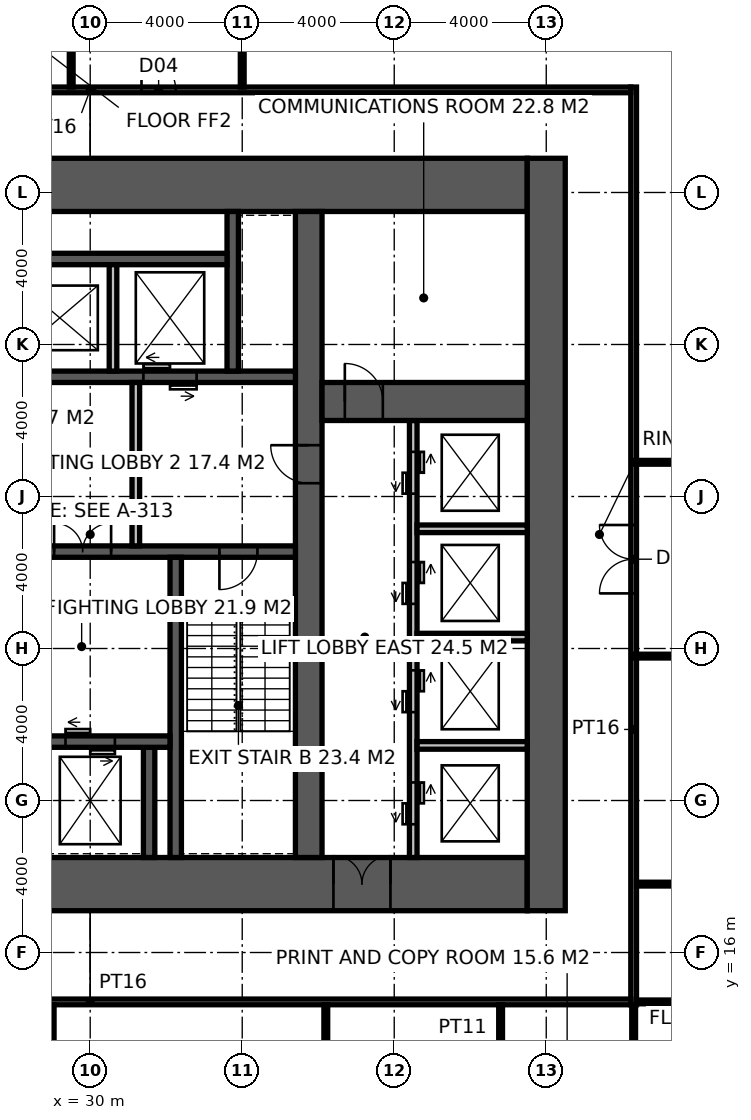
"""IFC4 building model, lengths in metres.
Left out: names, types, materials, properties, quantities, classifications, styles, units other than length and angle.
Written with IfcOpenShell. Run it as: python <this file> out.ifc"""

import sys

from ifc_helpers import new_model, si_unit, direction, frame, frame_2d, origin, place, context, subcontext, project, spatial, rectangle, extrude, element, fill, save


model = new_model("IFC4")
c1 = context("Model", 3, precision=1e-05, world=origin(), true_north=direction((0.0, 1.0)))
c2 = subcontext(c1, "Body", "Model", "MODEL_VIEW")
j1 = project(units=[si_unit("LENGTHUNIT", "METRE"), si_unit("PLANEANGLEUNIT", "RADIAN")], contexts=[c1])
p1 = place(None, origin())
s1 = spatial("IfcSite", under=j1, at=p1, CompositionType="ELEMENT")
p2 = place(p1, origin())
s2 = spatial("IfcBuilding", under=s1, at=p2, CompositionType="ELEMENT")
p3 = place(p2, frame((0.0, 0.0, 39.0)))
s3 = spatial("IfcBuildingStorey", under=s2, at=p3, CompositionType="ELEMENT", Elevation=39.0)
p4 = place(p3, frame((18.5, 17.8, -0.15), z_axis=(0.0, 0.0, 1.0), x_axis=(1.0, 0.0, 0.0)))
e1 = element("IfcWall", 1, at=p4, inside=s3, PredefinedType="SHEAR", context=c2, shape_type="SweptSolid", body=[
    extrude(rectangle(XDim=23.0, YDim=1.4, at=frame_2d((11.5, 0.0))), origin(), (0.0, 0.0, 1.0), 4.0),
])
p5 = place(p4, frame((3.45, 0.0, 0.15)))
e2 = element("IfcOpeningElement", 2, at=p5, cuts=e1, PredefinedType="OPENING", context=c2, shape_type="SweptSolid", body=[
    extrude(rectangle(XDim=1.5, YDim=2.4, at=frame_2d((0.75, 1.2))), frame((0.0, 0.71, 0.0), z_axis=(0.0, -1.0, 0.0), x_axis=(1.0, 0.0, 0.0)), (0.0, 0.0, 1.0), 1.42),
])
p6 = place(p4, frame((17.9, 0.0, 0.15)))
e3 = element("IfcOpeningElement", 3, at=p6, cuts=e1, PredefinedType="OPENING", context=c2, shape_type="SweptSolid", body=[
    extrude(rectangle(XDim=1.5, YDim=2.4, at=frame_2d((0.75, 1.2))), frame((0.0, 0.71, 0.0), z_axis=(0.0, -1.0, 0.0), x_axis=(1.0, 0.0, 0.0)), (0.0, 0.0, 1.0), 1.42),
])
p7 = place(p4, frame((0.9, 0.0, 0.15)))
e4 = element("IfcOpeningElement", 4, at=p7, cuts=e1, PredefinedType="OPENING", context=c2, shape_type="SweptSolid", body=[
    extrude(rectangle(XDim=1.0, YDim=2.2, at=frame_2d((0.5, 1.1))), frame((0.0, 0.71, 0.0), z_axis=(0.0, -1.0, 0.0), x_axis=(1.0, 0.0, 0.0)), (0.0, 0.0, 1.0), 1.42),
])
p8 = place(p3, frame((18.5, 36.2, -0.15), z_axis=(0.0, 0.0, 1.0), x_axis=(1.0, 0.0, 0.0)))
e5 = element("IfcWall", 5, at=p8, inside=s3, PredefinedType="SHEAR", context=c2, shape_type="SweptSolid", body=[
    extrude(rectangle(XDim=23.0, YDim=1.4, at=frame_2d((11.5, 0.0))), origin(), (0.0, 0.0, 1.0), 4.0),
])
p9 = place(p3, frame((42.0, 17.1, -0.15), z_axis=(0.0, 0.0, 1.0), x_axis=(0.0, 1.0, 0.0)))
e6 = element("IfcWall", 6, at=p9, inside=s3, PredefinedType="SHEAR", context=c2, shape_type="SweptSolid", body=[
    extrude(rectangle(XDim=19.8, YDim=1.0, at=frame_2d((9.9, 0.0))), origin(), (0.0, 0.0, 1.0), 4.0),
])
p10 = place(p3, frame((35.75, 18.5, -0.15), z_axis=(0.0, 0.0, 1.0), x_axis=(0.0, 1.0, 0.0)))
e7 = element("IfcWall", 7, at=p10, inside=s3, PredefinedType="SHEAR", context=c2, shape_type="SweptSolid", body=[
    extrude(rectangle(XDim=17.0, YDim=0.7, at=frame_2d((8.5, 0.0))), origin(), (0.0, 0.0, 1.0), 4.0),
])
p11 = place(p10, frame((9.85, 0.0, 0.15)))
e8 = element("IfcOpeningElement", 8, at=p11, cuts=e7, PredefinedType="OPENING", context=c2, shape_type="SweptSolid", body=[
    extrude(rectangle(XDim=1.0, YDim=2.2, at=frame_2d((0.5, 1.1))), frame((0.0, 0.36, 0.0), z_axis=(0.0, -1.0, 0.0), x_axis=(1.0, 0.0, 0.0)), (0.0, 0.0, 1.0), 0.72),
])
p12 = place(p3, frame((24.15, 26.55, -0.15), z_axis=(0.0, 0.0, 1.0), x_axis=(1.0, 0.0, 0.0)))
e9 = element("IfcWall", 9, at=p12, inside=s3, PredefinedType="SHEAR", context=c2, shape_type="SweptSolid", body=[
    extrude(rectangle(XDim=11.25, YDim=0.3, at=frame_2d((5.625, 0.0))), origin(), (0.0, 0.0, 1.0), 4.0),
])
p13 = place(p12, frame((9.25, 0.0, 0.15)))
e10 = element("IfcOpeningElement", 10, at=p13, cuts=e9, PredefinedType="OPENING", context=c2, shape_type="SweptSolid", body=[
    extrude(rectangle(XDim=1.0, YDim=2.2, at=frame_2d((0.5, 1.1))), frame((0.0, 0.16, 0.0), z_axis=(0.0, -1.0, 0.0), x_axis=(1.0, 0.0, 0.0)), (0.0, 0.0, 1.0), 0.32),
])
p14 = place(p12, frame((4.9, 0.0, 0.15)))
e11 = element("IfcOpeningElement", 11, at=p14, cuts=e9, PredefinedType="OPENING", context=c2, shape_type="SweptSolid", body=[
    extrude(rectangle(XDim=1.5, YDim=2.4, at=frame_2d((0.75, 1.2))), frame((0.0, 0.16, 0.0), z_axis=(0.0, -1.0, 0.0), x_axis=(1.0, 0.0, 0.0)), (0.0, 0.0, 1.0), 0.32),
])
p15 = place(p3, frame((32.25, 18.5, -0.15), z_axis=(0.0, 0.0, 1.0), x_axis=(0.0, 1.0, 0.0)))
e12 = element("IfcWall", 12, at=p15, inside=s3, PredefinedType="SHEAR", context=c2, shape_type="SweptSolid", body=[
    extrude(rectangle(XDim=7.9, YDim=0.3, at=frame_2d((3.95, 0.0))), origin(), (0.0, 0.0, 1.0), 4.0),
])
p16 = place(p3, frame((31.55, 18.5, -0.15), z_axis=(0.0, 0.0, 1.0), x_axis=(0.0, 1.0, 0.0)))
e13 = element("IfcWall", 13, at=p16, inside=s3, PredefinedType="SHEAR", context=c2, shape_type="SweptSolid", body=[
    extrude(rectangle(XDim=2.9, YDim=0.3, at=frame_2d((1.45, 0.0))), origin(), (0.0, 0.0, 1.0), 4.0),
])
p17 = place(p3, frame((28.3, 21.55, -0.15), z_axis=(0.0, 0.0, 1.0), x_axis=(1.0, 0.0, 0.0)))
e14 = element("IfcWall", 14, at=p17, inside=s3, PredefinedType="SHEAR", context=c2, shape_type="SweptSolid", body=[
    extrude(rectangle(XDim=3.8, YDim=0.3, at=frame_2d((1.9, 0.0))), origin(), (0.0, 0.0, 1.0), 4.0),
])
p18 = place(p17, frame((1.05, 0.0, 0.15)))
e15 = element("IfcOpeningElement", 15, at=p18, cuts=e14, PredefinedType="OPENING", context=c2, shape_type="SweptSolid", body=[
    extrude(rectangle(XDim=1.3, YDim=2.4, at=frame_2d((0.65, 1.2))), frame((0.0, 0.16, 0.0), z_axis=(0.0, -1.0, 0.0), x_axis=(1.0, 0.0, 0.0)), (0.0, 0.0, 1.0), 0.32),
])
p19 = place(p3, frame((24.15, 31.15, -0.15), z_axis=(0.0, 0.0, 1.0), x_axis=(1.0, 0.0, 0.0)))
e16 = element("IfcWall", 16, at=p19, inside=s3, PredefinedType="SHEAR", context=c2, shape_type="SweptSolid", body=[
    extrude(rectangle(XDim=11.25, YDim=0.3, at=frame_2d((5.625, 0.0))), origin(), (0.0, 0.0, 1.0), 4.0),
])
p20 = place(p19, frame((7.25, 0.0, 0.15)))
e17 = element("IfcOpeningElement", 17, at=p20, cuts=e16, PredefinedType="OPENING", context=c2, shape_type="SweptSolid", body=[
    extrude(rectangle(XDim=1.4, YDim=2.4, at=frame_2d((0.7, 1.2))), frame((0.0, 0.16, 0.0), z_axis=(0.0, -1.0, 0.0), x_axis=(1.0, 0.0, 0.0)), (0.0, 0.0, 1.0), 0.32),
])
p21 = place(p3, frame((33.75, 31.3, -0.15), z_axis=(0.0, 0.0, 1.0), x_axis=(0.0, 1.0, 0.0)))
e18 = element("IfcWall", 18, at=p21, inside=s3, PredefinedType="SHEAR", context=c2, shape_type="SweptSolid", body=[
    extrude(rectangle(XDim=4.2, YDim=0.3, at=frame_2d((2.1, 0.0))), origin(), (0.0, 0.0, 1.0), 4.0),
])
p22 = place(p3, frame((25.0, 34.25, -0.15), z_axis=(0.0, 0.0, 1.0), x_axis=(1.0, 0.0, 0.0)))
e19 = element("IfcWall", 19, at=p22, inside=s3, PredefinedType="SHEAR", context=c2, shape_type="SweptSolid", body=[
    extrude(rectangle(XDim=8.6, YDim=0.3, at=frame_2d((4.3, 0.0))), origin(), (0.0, 0.0, 1.0), 4.0),
])
p23 = place(p3, frame((30.6, 31.3, -0.15), z_axis=(0.0, 0.0, 1.0), x_axis=(0.0, 1.0, 0.0)))
e20 = element("IfcWall", 20, at=p23, inside=s3, PredefinedType="SOLIDWALL", context=c2, shape_type="SweptSolid", body=[
    extrude(rectangle(XDim=2.8, YDim=0.2, at=frame_2d((1.4, 0.0))), origin(), (0.0, 0.0, 1.0), 4.0),
])
p24 = place(p3, frame((38.5, 18.5, -0.15), z_axis=(0.0, 0.0, 1.0), x_axis=(0.0, 1.0, 0.0)))
e21 = element("IfcWall", 21, at=p24, inside=s3, PredefinedType="SOLIDWALL", context=c2, shape_type="SweptSolid", body=[
    extrude(rectangle(XDim=11.5, YDim=0.2, at=frame_2d((5.75, 0.0))), origin(), (0.0, 0.0, 1.0), 4.0),
])
p25 = place(p24, frame((0.875, 0.0, 0.15)))
e22 = element("IfcOpeningElement", 22, at=p25, cuts=e21, PredefinedType="OPENING", context=c2, shape_type="SweptSolid", body=[
    extrude(rectangle(XDim=1.1, YDim=2.2, at=frame_2d((0.55, 1.1))), frame((0.0, 0.11, 0.0), z_axis=(0.0, -1.0, 0.0), x_axis=(1.0, 0.0, 0.0)), (0.0, 0.0, 1.0), 0.22),
])
p26 = place(p24, frame((3.825, 0.0, 0.15)))
e23 = element("IfcOpeningElement", 23, at=p26, cuts=e21, PredefinedType="OPENING", context=c2, shape_type="SweptSolid", body=[
    extrude(rectangle(XDim=1.1, YDim=2.2, at=frame_2d((0.55, 1.1))), frame((0.0, 0.11, 0.0), z_axis=(0.0, -1.0, 0.0), x_axis=(1.0, 0.0, 0.0)), (0.0, 0.0, 1.0), 0.22),
])
p27 = place(p24, frame((6.675, 0.0, 0.15)))
e24 = element("IfcOpeningElement", 24, at=p27, cuts=e21, PredefinedType="OPENING", context=c2, shape_type="SweptSolid", body=[
    extrude(rectangle(XDim=1.1, YDim=2.2, at=frame_2d((0.55, 1.1))), frame((0.0, 0.11, 0.0), z_axis=(0.0, -1.0, 0.0), x_axis=(1.0, 0.0, 0.0)), (0.0, 0.0, 1.0), 0.22),
])
p28 = place(p24, frame((9.575, 0.0, 0.15)))
e25 = element("IfcOpeningElement", 25, at=p28, cuts=e21, PredefinedType="OPENING", context=c2, shape_type="SweptSolid", body=[
    extrude(rectangle(XDim=1.1, YDim=2.2, at=frame_2d((0.55, 1.1))), frame((0.0, 0.11, 0.0), z_axis=(0.0, -1.0, 0.0), x_axis=(1.0, 0.0, 0.0)), (0.0, 0.0, 1.0), 0.22),
])
p29 = place(p3, frame((36.1, 30.5, -0.15), z_axis=(0.0, 0.0, 1.0), x_axis=(1.0, 0.0, 0.0)))
e26 = element("IfcWall", 26, at=p29, inside=s3, PredefinedType="SHEAR", context=c2, shape_type="SweptSolid", body=[
    extrude(rectangle(XDim=5.4, YDim=1.0, at=frame_2d((2.7, 0.0))), origin(), (0.0, 0.0, 1.0), 4.0),
])
p30 = place(p29, frame((0.6, 0.0, 0.15)))
e27 = element("IfcOpeningElement", 27, at=p30, cuts=e26, PredefinedType="OPENING", context=c2, shape_type="SweptSolid", body=[
    extrude(rectangle(XDim=1.0, YDim=2.2, at=frame_2d((0.5, 1.1))), frame((0.0, 0.51, 0.0), z_axis=(0.0, -1.0, 0.0), x_axis=(1.0, 0.0, 0.0)), (0.0, 0.0, 1.0), 1.02),
])
for number, where, z_axis, x_axis in (
    (28, (38.6, 21.45, -0.15), (0.0, 0.0, 1.0), (1.0, 0.0, 0.0)),
    (29, (38.6, 24.3, -0.15), (0.0, 0.0, 1.0), (1.0, 0.0, 0.0)),
    (30, (38.6, 27.15, -0.15), (0.0, 0.0, 1.0), (1.0, 0.0, 0.0)),
):
    element("IfcWall", number, at=place(p3, frame(where, z_axis=z_axis, x_axis=x_axis)), inside=s3, PredefinedType="SOLIDWALL", context=c2, shape_type="SweptSolid", body=[
        extrude(rectangle(XDim=2.9, YDim=0.2, at=frame_2d((1.45, 0.0))), origin(), (0.0, 0.0, 1.0), 4.0),
    ])
p31 = place(p3, frame((31.2, 26.7, 0.0), z_axis=(0.0, 0.0, 1.0), x_axis=(0.0, 1.0, 0.0)))
e31 = element("IfcWall", 31, at=p31, inside=s3, PredefinedType="SOLIDWALL", context=c2, shape_type="SweptSolid", body=[
    extrude(rectangle(XDim=4.3, YDim=0.2, at=frame_2d((2.15, 0.0))), origin(), (0.0, 0.0, 1.0), 3.85),
])
p32 = place(p3, frame((44.3, 14.625, 0.0), z_axis=(0.0, 0.0, 1.0), x_axis=(0.0, 1.0, 0.0)))
e32 = element("IfcWall", 32, at=p32, inside=s3, PredefinedType="PARTITIONING", context=c2, shape_type="SweptSolid", body=[
    extrude(rectangle(XDim=24.15, YDim=0.15, at=frame_2d((12.075, 0.0))), origin(), (0.0, 0.0, 1.0), 3.85),
])
p33 = place(p32, frame((10.825, 0.0, 0.0)))
e33 = element("IfcOpeningElement", 33, at=p33, cuts=e32, PredefinedType="OPENING", context=c2, shape_type="SweptSolid", body=[
    extrude(rectangle(XDim=1.8, YDim=2.4, at=frame_2d((0.9, 1.2))), frame((0.0, 0.085, 0.0), z_axis=(0.0, -1.0, 0.0), x_axis=(1.0, 0.0, 0.0)), (0.0, 0.0, 1.0), 0.17),
])
p34 = place(p3, frame((15.775, 14.7, 0.0), z_axis=(0.0, 0.0, 1.0), x_axis=(1.0, 0.0, 0.0)))
e34 = element("IfcWall", 34, at=p34, inside=s3, PredefinedType="PARTITIONING", context=c2, shape_type="SweptSolid", body=[
    extrude(rectangle(XDim=28.45, YDim=0.15, at=frame_2d((14.225, 0.0))), origin(), (0.0, 0.0, 1.0), 3.85),
])
p35 = place(p3, frame((15.775, 38.7, 0.0), z_axis=(0.0, 0.0, 1.0), x_axis=(1.0, 0.0, 0.0)))
e35 = element("IfcWall", 35, at=p35, inside=s3, PredefinedType="PARTITIONING", context=c2, shape_type="SweptSolid", body=[
    extrude(rectangle(XDim=28.45, YDim=0.15, at=frame_2d((14.225, 0.0))), origin(), (0.0, 0.0, 1.0), 3.85),
])
p36 = place(p35, frame((7.975, 0.0, 0.0)))
e36 = element("IfcOpeningElement", 36, at=p36, cuts=e35, PredefinedType="OPENING", context=c2, shape_type="SweptSolid", body=[
    extrude(rectangle(XDim=0.9, YDim=2.1, at=frame_2d((0.45, 1.05))), frame((0.0, 0.085, 0.0), z_axis=(0.0, -1.0, 0.0), x_axis=(1.0, 0.0, 0.0)), (0.0, 0.0, 1.0), 0.17),
])
p37 = place(p35, frame((11.725, 0.0, 0.0)))
e37 = element("IfcOpeningElement", 37, at=p37, cuts=e35, PredefinedType="OPENING", context=c2, shape_type="SweptSolid", body=[
    extrude(rectangle(XDim=1.0, YDim=2.1, at=frame_2d((0.5, 1.05))), frame((0.0, 0.085, 0.0), z_axis=(0.0, -1.0, 0.0), x_axis=(1.0, 0.0, 0.0)), (0.0, 0.0, 1.0), 0.17),
])
p38 = place(p35, frame((15.575, 0.0, 0.0)))
e38 = element("IfcOpeningElement", 38, at=p38, cuts=e35, PredefinedType="OPENING", context=c2, shape_type="SweptSolid", body=[
    extrude(rectangle(XDim=0.9, YDim=2.1, at=frame_2d((0.45, 1.05))), frame((0.0, 0.085, 0.0), z_axis=(0.0, -1.0, 0.0), x_axis=(1.0, 0.0, 0.0)), (0.0, 0.0, 1.0), 0.17),
])
p39 = place(p3, frame((34.0, 38.775, 0.0), z_axis=(0.0, 0.0, 1.0), x_axis=(0.0, 1.0, 0.0)))
e39 = element("IfcWall", 39, at=p39, inside=s3, PredefinedType="PARTITIONING", context=c2, shape_type="SweptSolid", body=[
    extrude(rectangle(XDim=3.275, YDim=0.1, at=frame_2d((1.638, 0.0))), origin(), (0.0, 0.0, 1.0), 2.65),
])
p40 = place(p3, frame((29.5, 38.775, 0.0), z_axis=(0.0, 0.0, 1.0), x_axis=(0.0, 1.0, 0.0)))
e40 = element("IfcWall", 40, at=p40, inside=s3, PredefinedType="PARTITIONING", context=c2, shape_type="SweptSolid", body=[
    extrude(rectangle(XDim=3.175, YDim=0.1, at=frame_2d((1.587, 0.0))), origin(), (0.0, 0.0, 1.0), 2.65),
])
for number, where, z_axis, x_axis in (
    (41, (44.375, 14.7, 0.0), (0.0, 0.0, 1.0), (1.0, 0.0, 0.0)),
    (42, (44.375, 17.8, 0.0), (0.0, 0.0, 1.0), (1.0, 0.0, 0.0)),
):
    element("IfcWall", number, at=place(p3, frame(where, z_axis=z_axis, x_axis=x_axis)), inside=s3, PredefinedType="PARTITIONING", context=c2, shape_type="SweptSolid", body=[
        extrude(rectangle(XDim=3.575, YDim=0.1, at=frame_2d((1.788, 0.0))), origin(), (0.0, 0.0, 1.0), 3.85),
    ])
for number, where, z_axis, x_axis in (
    (43, (28.999, 9.95, 0.0), (0.0, 0.0, 1.0), (0.0, 1.0, 0.0)),
    (44, (36.199, 9.95, 0.0), (0.0, 0.0, 1.0), (0.0, 1.0, 0.0)),
    (45, (40.799, 9.95, 0.0), (0.0, 0.0, 1.0), (0.0, 1.0, 0.0)),
    (46, (44.3, 9.95, 0.0), (0.0, 0.0, 1.0), (0.0, 1.0, 0.0)),
):
    element("IfcWall", number, at=place(p3, frame(where, z_axis=z_axis, x_axis=x_axis)), inside=s3, PredefinedType="PARTITIONING", context=c2, shape_type="SweptSolid", body=[
        extrude(rectangle(XDim=4.675, YDim=0.1, at=frame_2d((2.337, 0.0))), origin(), (0.0, 0.0, 1.0), 3.85),
    ])
p41 = place(p3, frame((44.3, 23.8, 0.0), z_axis=(0.0, 0.0, 1.0), x_axis=(1.0, 0.0, 0.0)))
e47 = element("IfcWall", 47, at=p41, inside=s3, PredefinedType="PARTITIONING", context=c2, shape_type="SweptSolid", body=[
    extrude(rectangle(XDim=4.5, YDim=0.1, at=frame_2d((2.25, 0.0))), origin(), (0.0, 0.0, 1.0), 2.65),
])
p42 = place(p3, frame((48.8, 28.9, 0.0), z_axis=(0.0, 0.0, 1.0), x_axis=(-1.0, 0.0, 0.0)))
e48 = element("IfcWall", 48, at=p42, inside=s3, PredefinedType="PARTITIONING", context=c2, shape_type="SweptSolid", body=[
    extrude(rectangle(XDim=4.5, YDim=0.1, at=frame_2d((2.25, 0.0))), origin(), (0.0, 0.0, 1.0), 3.85),
])
p43 = place(p13, frame((1.0, 0.0, 0.0), z_axis=(0.0, 0.0, 1.0), x_axis=(-1.0, 0.0, 0.0)))
e49 = element("IfcDoor", 49, at=p43, inside=s3, OperationType="SINGLE_SWING_RIGHT", PredefinedType="DOOR", context=c2, shape_type="SweptSolid", body=[
    extrude(rectangle(XDim=1.0, YDim=2.2, at=frame_2d((0.5, 1.1))), frame((0.0, 0.025, 0.0), z_axis=(0.0, -1.0, 0.0), x_axis=(1.0, 0.0, 0.0)), (0.0, 0.0, 1.0), 0.05),
])
fill(e10, e49)
p44 = place(p11, origin())
e50 = element("IfcDoor", 50, at=p44, inside=s3, OperationType="SINGLE_SWING_RIGHT", PredefinedType="DOOR", context=c2, shape_type="SweptSolid", body=[
    extrude(rectangle(XDim=1.0, YDim=2.2, at=frame_2d((0.5, 1.1))), frame((0.0, 0.025, 0.0), z_axis=(0.0, -1.0, 0.0), x_axis=(1.0, 0.0, 0.0)), (0.0, 0.0, 1.0), 0.05),
])
fill(e8, e50)
p45 = place(p14, origin())
e51 = element("IfcDoor", 51, at=p45, inside=s3, OperationType="DOUBLE_DOOR_DOUBLE_SWING", PredefinedType="DOOR", context=c2, shape_type="SweptSolid", body=[
    extrude(rectangle(XDim=1.5, YDim=2.4, at=frame_2d((0.75, 1.2))), frame((0.0, 0.025, 0.0), z_axis=(0.0, -1.0, 0.0), x_axis=(1.0, 0.0, 0.0)), (0.0, 0.0, 1.0), 0.05),
])
fill(e11, e51)
p46 = place(p6, origin())
e52 = element("IfcDoor", 52, at=p46, inside=s3, OperationType="DOUBLE_DOOR_DOUBLE_SWING", PredefinedType="DOOR", context=c2, shape_type="SweptSolid", body=[
    extrude(rectangle(XDim=1.5, YDim=2.4, at=frame_2d((0.75, 1.2))), frame((0.0, 0.025, 0.0), z_axis=(0.0, -1.0, 0.0), x_axis=(1.0, 0.0, 0.0)), (0.0, 0.0, 1.0), 0.05),
])
fill(e3, e52)
p47 = place(p30, origin())
e53 = element("IfcDoor", 53, at=p47, inside=s3, OperationType="SINGLE_SWING_LEFT", PredefinedType="DOOR", context=c2, shape_type="SweptSolid", body=[
    extrude(rectangle(XDim=1.0, YDim=2.2, at=frame_2d((0.5, 1.1))), frame((0.0, 0.025, 0.0), z_axis=(0.0, -1.0, 0.0), x_axis=(1.0, 0.0, 0.0)), (0.0, 0.0, 1.0), 0.05),
])
fill(e27, e53)
p48 = place(p38, origin())
e54 = element("IfcDoor", 54, at=p48, inside=s3, OperationType="SINGLE_SWING_LEFT", PredefinedType="DOOR", context=c2, shape_type="SweptSolid", body=[
    extrude(rectangle(XDim=0.9, YDim=2.1, at=frame_2d((0.45, 1.05))), frame((0.0, 0.025, 0.0), z_axis=(0.0, -1.0, 0.0), x_axis=(1.0, 0.0, 0.0)), (0.0, 0.0, 1.0), 0.05),
])
fill(e38, e54)
p49 = place(p33, origin())
e55 = element("IfcDoor", 55, at=p49, inside=s3, OperationType="DOUBLE_DOOR_DOUBLE_SWING", PredefinedType="DOOR", context=c2, shape_type="SweptSolid", body=[
    extrude(rectangle(XDim=1.8, YDim=2.4, at=frame_2d((0.9, 1.2))), frame((0.0, 0.025, 0.0), z_axis=(0.0, -1.0, 0.0), x_axis=(1.0, 0.0, 0.0)), (0.0, 0.0, 1.0), 0.05),
])
fill(e33, e55)
p50 = place(p18, origin())
e56 = element("IfcDoor", 56, at=p50, inside=s3, OperationType="DOUBLE_DOOR_SLIDING", PredefinedType="DOOR", context=c2, shape_type="SweptSolid", body=[
    extrude(rectangle(XDim=1.3, YDim=2.4, at=frame_2d((0.65, 1.2))), frame((0.0, 0.025, 0.0), z_axis=(0.0, -1.0, 0.0), x_axis=(1.0, 0.0, 0.0)), (0.0, 0.0, 1.0), 0.05),
])
fill(e15, e56)
p51 = place(p20, origin())
e57 = element("IfcDoor", 57, at=p51, inside=s3, OperationType="DOUBLE_DOOR_SLIDING", PredefinedType="DOOR", context=c2, shape_type="SweptSolid", body=[
    extrude(rectangle(XDim=1.4, YDim=2.4, at=frame_2d((0.7, 1.2))), frame((0.0, 0.025, 0.0), z_axis=(0.0, -1.0, 0.0), x_axis=(1.0, 0.0, 0.0)), (0.0, 0.0, 1.0), 0.05),
])
fill(e17, e57)
p52 = place(p25, origin())
e58 = element("IfcDoor", 58, at=p52, inside=s3, OperationType="DOUBLE_DOOR_SLIDING", PredefinedType="DOOR", context=c2, shape_type="SweptSolid", body=[
    extrude(rectangle(XDim=1.1, YDim=2.2, at=frame_2d((0.55, 1.1))), frame((0.0, 0.025, 0.0), z_axis=(0.0, -1.0, 0.0), x_axis=(1.0, 0.0, 0.0)), (0.0, 0.0, 1.0), 0.05),
])
fill(e22, e58)
p53 = place(p26, origin())
e59 = element("IfcDoor", 59, at=p53, inside=s3, OperationType="DOUBLE_DOOR_SLIDING", PredefinedType="DOOR", context=c2, shape_type="SweptSolid", body=[
    extrude(rectangle(XDim=1.1, YDim=2.2, at=frame_2d((0.55, 1.1))), frame((0.0, 0.025, 0.0), z_axis=(0.0, -1.0, 0.0), x_axis=(1.0, 0.0, 0.0)), (0.0, 0.0, 1.0), 0.05),
])
fill(e23, e59)
p54 = place(p27, origin())
e60 = element("IfcDoor", 60, at=p54, inside=s3, OperationType="DOUBLE_DOOR_SLIDING", PredefinedType="DOOR", context=c2, shape_type="SweptSolid", body=[
    extrude(rectangle(XDim=1.1, YDim=2.2, at=frame_2d((0.55, 1.1))), frame((0.0, 0.025, 0.0), z_axis=(0.0, -1.0, 0.0), x_axis=(1.0, 0.0, 0.0)), (0.0, 0.0, 1.0), 0.05),
])
fill(e24, e60)
p55 = place(p28, origin())
e61 = element("IfcDoor", 61, at=p55, inside=s3, OperationType="DOUBLE_DOOR_SLIDING", PredefinedType="DOOR", context=c2, shape_type="SweptSolid", body=[
    extrude(rectangle(XDim=1.1, YDim=2.2, at=frame_2d((0.55, 1.1))), frame((0.0, 0.025, 0.0), z_axis=(0.0, -1.0, 0.0), x_axis=(1.0, 0.0, 0.0)), (0.0, 0.0, 1.0), 0.05),
])
fill(e25, e61)
save(model, sys.argv[1])
